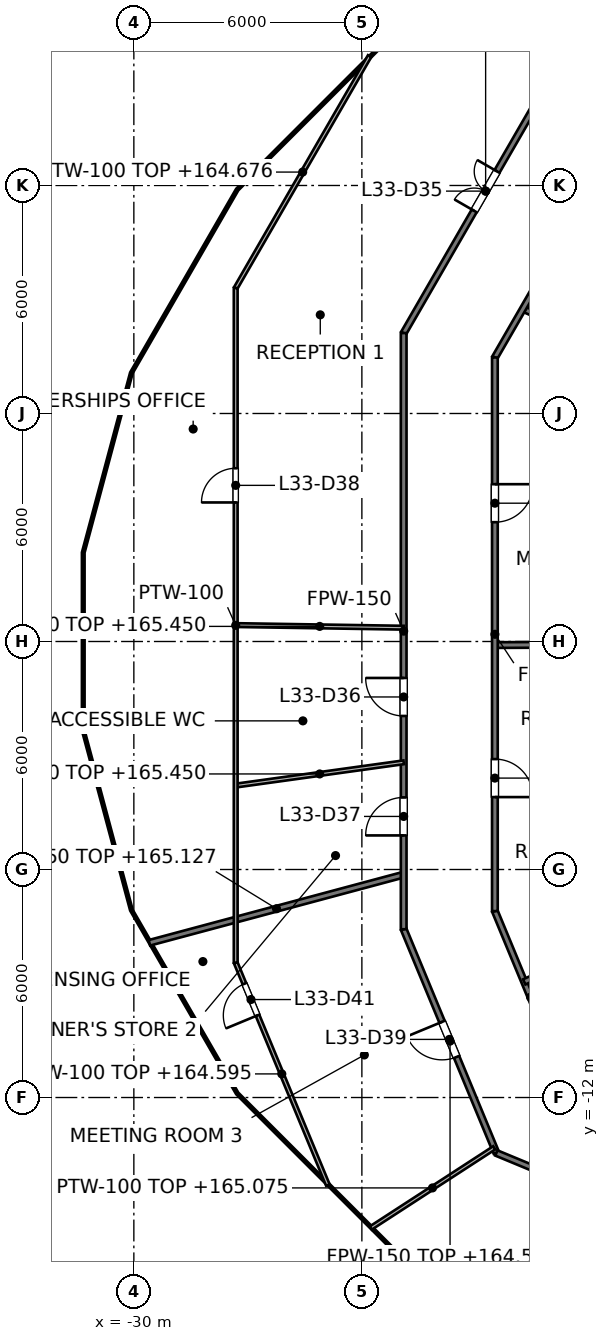
"""IFC4 building model, lengths in metres.
Left out: names, types, materials, properties, quantities, classifications, styles, units other than length and angle.
Written with IfcOpenShell. Run it as: python <this file> out.ifc"""

import sys

from ifc_helpers import new_model, si_unit, direction, frame, frame_2d, origin, place, context, subcontext, project, spatial, rectangle, extrude, element, fill, save


model = new_model("IFC4")
c1 = context("Model", 3, precision=1e-05, world=origin(), true_north=direction((0.0, 1.0)))
c2 = subcontext(c1, "Body", "Model", "MODEL_VIEW")
j1 = project(units=[si_unit("LENGTHUNIT", "METRE"), si_unit("PLANEANGLEUNIT", "RADIAN")], contexts=[c1])
p1 = place(None, origin())
s1 = spatial("IfcSite", under=j1, at=p1, CompositionType="ELEMENT")
p2 = place(p1, origin())
s2 = spatial("IfcBuilding", under=s1, at=p2, CompositionType="ELEMENT")
p3 = place(p2, frame((0.0, 0.0, 161.6)))
s3 = spatial("IfcBuildingStorey", under=s2, at=p3, CompositionType="ELEMENT", Elevation=161.6)
p4 = place(p3, frame((-22.9, -7.572, 0.0), z_axis=(0.0, 0.0, 1.0), x_axis=(0.382860357704, -0.923806227788, 0.0)))
e1 = element("IfcWall", 1, at=p4, inside=s3, PredefinedType="PARTITIONING", context=c2, shape_type="SweptSolid", body=[
    extrude(rectangle(XDim=6.374, YDim=0.15, at=frame_2d((3.187, 0.0))), origin(), (0.0, 0.0, 1.0), 2.995),
])
p5 = place(p4, frame((2.638, 0.0, 0.0)))
e2 = element("IfcOpeningElement", 2, at=p5, cuts=e1, PredefinedType="OPENING", context=c2, shape_type="SweptSolid", body=[
    extrude(rectangle(XDim=1.0, YDim=2.1, at=frame_2d((0.5, 1.05))), frame((0.0, 0.075, 0.0), z_axis=(0.0, -1.0, 0.0), x_axis=(1.0, 0.0, 0.0)), (0.0, 0.0, 1.0), 0.15),
])
p6 = place(p3, frame((-20.5, -7.095, 0.0), z_axis=(0.0, 0.0, 1.0), x_axis=(0.382878184095, -0.923798839653, 0.0)))
e3 = element("IfcWall", 3, at=p6, inside=s3, PredefinedType="PARTITIONING", context=c2, shape_type="SweptSolid", body=[
    extrude(rectangle(XDim=4.902, YDim=0.15, at=frame_2d((2.451, 0.0))), origin(), (0.0, 0.0, 1.0), 3.076),
])
p7 = place(p3, frame((-19.76, 8.755, 0.0), z_axis=(0.0, 0.0, 1.0), x_axis=(0.91424834547, -0.405154245695, 0.0)))
e4 = element("IfcWall", 4, at=p7, inside=s3, PredefinedType="PARTITIONING", context=c2, shape_type="SweptSolid", body=[
    extrude(rectangle(XDim=5.318, YDim=0.15, at=frame_2d((2.659, 0.0))), origin(), (0.0, 0.0, 1.0), 3.076),
])
p8 = place(p3, frame((-20.46, -13.46, 0.0), z_axis=(0.0, 0.0, 1.0), x_axis=(0.923801547606, -0.382871650349, 0.0)))
e5 = element("IfcWall", 5, at=p8, inside=s3, PredefinedType="PARTITIONING", context=c2, shape_type="SweptSolid", body=[
    extrude(rectangle(XDim=6.415, YDim=0.15, at=frame_2d((3.208, 0.0))), origin(), (0.0, 0.0, 1.0), 2.927),
])
p9 = place(p8, frame((2.707, 0.0, 0.0)))
e6 = element("IfcOpeningElement", 6, at=p9, cuts=e5, PredefinedType="OPENING", context=c2, shape_type="SweptSolid", body=[
    extrude(rectangle(XDim=1.0, YDim=2.1, at=frame_2d((0.5, 1.05))), frame((0.0, 0.075, 0.0), z_axis=(0.0, -1.0, 0.0), x_axis=(1.0, 0.0, 0.0)), (0.0, 0.0, 1.0), 0.15),
])
p10 = place(p3, frame((-20.5, -0.094, 0.0), z_axis=(0.0, 0.0, 1.0), x_axis=(0.999990148138, 0.004438876723, 0.0)))
e7 = element("IfcWall", 7, at=p10, inside=s3, PredefinedType="PARTITIONING", context=c2, shape_type="SweptSolid", body=[
    extrude(rectangle(XDim=5.5, YDim=0.15, at=frame_2d((2.75, 0.0))), origin(), (0.0, 0.0, 1.0), 2.927),
])
p11 = place(p3, frame((-29.591, -7.929, 0.0), z_axis=(0.0, 0.0, 1.0), x_axis=(0.965911864238, 0.258871146567, 0.0)))
e8 = element("IfcWall", 8, at=p11, inside=s3, PredefinedType="PARTITIONING", context=c2, shape_type="SweptSolid", body=[
    extrude(rectangle(XDim=6.927, YDim=0.15, at=frame_2d((3.463, 0.0))), origin(), (0.0, 0.0, 1.0), 3.527),
])
p12 = place(p3, frame((-19.728, -8.958, 0.0), z_axis=(0.0, 0.0, 1.0), x_axis=(0.910629511797, 0.413223779863, 0.0)))
e9 = element("IfcWall", 9, at=p12, inside=s3, PredefinedType="PARTITIONING", context=c2, shape_type="SweptSolid", body=[
    extrude(rectangle(XDim=5.368, YDim=0.15, at=frame_2d((2.684, 0.0))), origin(), (0.0, 0.0, 1.0), 3.85),
])
p13 = place(p3, frame((-20.5, 7.474, 0.0), z_axis=(0.0, 0.0, 1.0), x_axis=(0.500012665616, 0.866018091164, 0.0)))
e10 = element("IfcWall", 10, at=p13, inside=s3, PredefinedType="PARTITIONING", context=c2, shape_type="SweptSolid", body=[
    extrude(rectangle(XDim=6.602, YDim=0.15, at=frame_2d((3.301, 0.0))), origin(), (0.0, 0.0, 1.0), 2.995),
])
p14 = place(p13, frame((2.803, 0.0, 0.0)))
e11 = element("IfcOpeningElement", 11, at=p14, cuts=e10, PredefinedType="OPENING", context=c2, shape_type="SweptSolid", body=[
    extrude(rectangle(XDim=1.0, YDim=2.1, at=frame_2d((0.5, 1.05))), frame((0.0, 0.075, 0.0), z_axis=(0.0, -1.0, 0.0), x_axis=(1.0, 0.0, 0.0)), (0.0, 0.0, 1.0), 0.15),
])
p15 = place(p3, frame((-22.9, 8.117, 0.0), z_axis=(0.0, 0.0, 1.0), x_axis=(0.499996047583, 0.866027685701, 0.0)))
e12 = element("IfcWall", 12, at=p15, inside=s3, PredefinedType="PARTITIONING", context=c2, shape_type="SweptSolid", body=[
    extrude(rectangle(XDim=8.625, YDim=0.15, at=frame_2d((4.313, 0.0))), origin(), (0.0, 0.0, 1.0), 2.995),
])
p16 = place(p15, frame((3.713, 0.0, 0.0)))
e13 = element("IfcOpeningElement", 13, at=p16, cuts=e12, PredefinedType="OPENING", context=c2, shape_type="SweptSolid", body=[
    extrude(rectangle(XDim=1.2, YDim=2.1, at=frame_2d((0.6, 1.05))), frame((0.0, 0.075, 0.0), z_axis=(0.0, -1.0, 0.0), x_axis=(1.0, 0.0, 0.0)), (0.0, 0.0, 1.0), 0.15),
])
p17 = place(p3, frame((-20.5, -7.095, 0.0), z_axis=(0.0, 0.0, 1.0), x_axis=(0.0, 1.0, 0.0)))
e14 = element("IfcWall", 14, at=p17, inside=s3, PredefinedType="PARTITIONING", context=c2, shape_type="SweptSolid", body=[
    extrude(rectangle(XDim=14.569, YDim=0.15, at=frame_2d((7.285, 0.0))), origin(), (0.0, 0.0, 1.0), 2.927),
])
p18 = place(p17, frame((10.234, 0.0, 0.0)))
e15 = element("IfcOpeningElement", 15, at=p18, cuts=e14, PredefinedType="OPENING", context=c2, shape_type="SweptSolid", body=[
    extrude(rectangle(XDim=1.0, YDim=2.1, at=frame_2d((0.5, 1.05))), frame((0.0, 0.075, 0.0), z_axis=(0.0, -1.0, 0.0), x_axis=(1.0, 0.0, 0.0)), (0.0, 0.0, 1.0), 0.15),
])
p19 = place(p17, frame((3.0, 0.0, 0.0)))
e16 = element("IfcOpeningElement", 16, at=p19, cuts=e14, PredefinedType="OPENING", context=c2, shape_type="SweptSolid", body=[
    extrude(rectangle(XDim=1.0, YDim=2.1, at=frame_2d((0.5, 1.05))), frame((0.0, 0.075, 0.0), z_axis=(0.0, -1.0, 0.0), x_axis=(1.0, 0.0, 0.0)), (0.0, 0.0, 1.0), 0.15),
])
p20 = place(p3, frame((-22.9, -7.572, 0.0), z_axis=(0.0, 0.0, 1.0), x_axis=(0.0, 1.0, 0.0)))
e17 = element("IfcWall", 17, at=p20, inside=s3, PredefinedType="PARTITIONING", context=c2, shape_type="SweptSolid", body=[
    extrude(rectangle(XDim=15.689, YDim=0.15, at=frame_2d((7.844, 0.0))), origin(), (0.0, 0.0, 1.0), 2.927),
])
p21 = place(p20, frame((5.612, 0.0, 0.0)))
e18 = element("IfcOpeningElement", 18, at=p21, cuts=e17, PredefinedType="OPENING", context=c2, shape_type="SweptSolid", body=[
    extrude(rectangle(XDim=1.0, YDim=2.1, at=frame_2d((0.5, 1.05))), frame((0.0, 0.075, 0.0), z_axis=(0.0, -1.0, 0.0), x_axis=(1.0, 0.0, 0.0)), (0.0, 0.0, 1.0), 0.15),
])
p22 = place(p20, frame((2.469, 0.0, 0.0)))
e19 = element("IfcOpeningElement", 19, at=p22, cuts=e17, PredefinedType="OPENING", context=c2, shape_type="SweptSolid", body=[
    extrude(rectangle(XDim=1.0, YDim=2.1, at=frame_2d((0.5, 1.05))), frame((0.0, 0.075, 0.0), z_axis=(0.0, -1.0, 0.0), x_axis=(1.0, 0.0, 0.0)), (0.0, 0.0, 1.0), 0.15),
])
p23 = place(p3, frame((-27.32, -8.452, 0.0), z_axis=(0.0, 0.0, 1.0), x_axis=(0.382847431698, -0.923811584709, 0.0)))
e20 = element("IfcWall", 20, at=p23, inside=s3, PredefinedType="PARTITIONING", context=c2, shape_type="SweptSolid", body=[
    extrude(rectangle(XDim=6.337, YDim=0.1, at=frame_2d((3.168, 0.0))), origin(), (0.0, 0.0, 1.0), 2.995),
])
p24 = place(p23, frame((0.6, 0.0, 0.0)))
e21 = element("IfcOpeningElement", 21, at=p24, cuts=e20, PredefinedType="OPENING", context=c2, shape_type="SweptSolid", body=[
    extrude(rectangle(XDim=0.9, YDim=2.1, at=frame_2d((0.45, 1.05))), frame((0.0, 0.05, 0.0), z_axis=(0.0, -1.0, 0.0), x_axis=(1.0, 0.0, 0.0)), (0.0, 0.0, 1.0), 0.1),
])
p25 = place(p3, frame((-27.32, 0.432, 0.0), z_axis=(0.0, 0.0, 1.0), x_axis=(0.999878719173, -0.015573918741, 0.0)))
e22 = element("IfcWall", 22, at=p25, inside=s3, PredefinedType="PARTITIONING", context=c2, shape_type="SweptSolid", body=[
    extrude(rectangle(XDim=4.421, YDim=0.1, at=frame_2d((2.21, 0.0))), origin(), (0.0, 0.0, 1.0), 3.85),
])
p26 = place(p3, frame((-27.32, -3.792, 0.0), z_axis=(0.0, 0.0, 1.0), x_axis=(0.990518967412, 0.137376035745, 0.0)))
e23 = element("IfcWall", 23, at=p26, inside=s3, PredefinedType="PARTITIONING", context=c2, shape_type="SweptSolid", body=[
    extrude(rectangle(XDim=4.462, YDim=0.1, at=frame_2d((2.231, 0.0))), origin(), (0.0, 0.0, 1.0), 3.85),
])
p27 = place(p3, frame((-23.766, -15.434, 0.0), z_axis=(0.0, 0.0, 1.0), x_axis=(0.838650885555, 0.544669342039, 0.0)))
e24 = element("IfcWall", 24, at=p27, inside=s3, PredefinedType="PARTITIONING", context=c2, shape_type="SweptSolid", body=[
    extrude(rectangle(XDim=3.874, YDim=0.1, at=frame_2d((1.937, 0.0))), origin(), (0.0, 0.0, 1.0), 3.475),
])
p28 = place(p3, frame((-27.32, 9.301, 0.0), z_axis=(0.0, 0.0, 1.0), x_axis=(0.500043278267, 0.866000415624, 0.0)))
e25 = element("IfcWall", 25, at=p28, inside=s3, PredefinedType="PARTITIONING", context=c2, shape_type="SweptSolid", body=[
    extrude(rectangle(XDim=7.048, YDim=0.1, at=frame_2d((3.524, 0.0))), origin(), (0.0, 0.0, 1.0), 3.076),
])
p29 = place(p3, frame((-27.32, -8.452, 0.0), z_axis=(0.0, 0.0, 1.0), x_axis=(0.0, 1.0, 0.0)))
e26 = element("IfcWall", 26, at=p29, inside=s3, PredefinedType="PARTITIONING", context=c2, shape_type="SweptSolid", body=[
    extrude(rectangle(XDim=17.753, YDim=0.1, at=frame_2d((8.876, 0.0))), origin(), (0.0, 0.0, 1.0), 2.927),
])
p30 = place(p29, frame((12.111, 0.0, 0.0)))
e27 = element("IfcOpeningElement", 27, at=p30, cuts=e26, PredefinedType="OPENING", context=c2, shape_type="SweptSolid", body=[
    extrude(rectangle(XDim=0.9, YDim=2.1, at=frame_2d((0.45, 1.05))), frame((0.0, 0.05, 0.0), z_axis=(0.0, -1.0, 0.0), x_axis=(1.0, 0.0, 0.0)), (0.0, 0.0, 1.0), 0.1),
])
p31 = place(p18, origin())
e28 = element("IfcDoor", 28, at=p31, inside=s3, OperationType="SINGLE_SWING_RIGHT", PredefinedType="DOOR", context=c2, shape_type="SweptSolid", body=[
    extrude(rectangle(XDim=1.0, YDim=2.1, at=frame_2d((0.5, 1.05))), frame((0.0, 0.025, 0.0), z_axis=(0.0, -1.0, 0.0), x_axis=(1.0, 0.0, 0.0)), (0.0, 0.0, 1.0), 0.05),
])
fill(e15, e28)
p32 = place(p19, origin())
e29 = element("IfcDoor", 29, at=p32, inside=s3, OperationType="SINGLE_SWING_LEFT", PredefinedType="DOOR", context=c2, shape_type="SweptSolid", body=[
    extrude(rectangle(XDim=1.0, YDim=2.1, at=frame_2d((0.5, 1.05))), frame((0.0, 0.025, 0.0), z_axis=(0.0, -1.0, 0.0), x_axis=(1.0, 0.0, 0.0)), (0.0, 0.0, 1.0), 0.05),
])
fill(e16, e29)
p33 = place(p16, origin())
e30 = element("IfcDoor", 30, at=p33, inside=s3, OperationType="DOUBLE_DOOR_SINGLE_SWING", PredefinedType="DOOR", context=c2, shape_type="SweptSolid", body=[
    extrude(rectangle(XDim=1.2, YDim=2.1, at=frame_2d((0.6, 1.05))), frame((0.0, 0.025, 0.0), z_axis=(0.0, -1.0, 0.0), x_axis=(1.0, 0.0, 0.0)), (0.0, 0.0, 1.0), 0.05),
])
fill(e13, e30)
p34 = place(p21, origin())
e31 = element("IfcDoor", 31, at=p34, inside=s3, OperationType="SINGLE_SWING_RIGHT", PredefinedType="DOOR", context=c2, shape_type="SweptSolid", body=[
    extrude(rectangle(XDim=1.0, YDim=2.1, at=frame_2d((0.5, 1.05))), frame((0.0, 0.025, 0.0), z_axis=(0.0, -1.0, 0.0), x_axis=(1.0, 0.0, 0.0)), (0.0, 0.0, 1.0), 0.05),
])
fill(e18, e31)
p35 = place(p22, origin())
e32 = element("IfcDoor", 32, at=p35, inside=s3, OperationType="SINGLE_SWING_LEFT", PredefinedType="DOOR", context=c2, shape_type="SweptSolid", body=[
    extrude(rectangle(XDim=1.0, YDim=2.1, at=frame_2d((0.5, 1.05))), frame((0.0, 0.025, 0.0), z_axis=(0.0, -1.0, 0.0), x_axis=(1.0, 0.0, 0.0)), (0.0, 0.0, 1.0), 0.05),
])
fill(e19, e32)
p36 = place(p30, origin())
e33 = element("IfcDoor", 33, at=p36, inside=s3, OperationType="SINGLE_SWING_LEFT", PredefinedType="DOOR", context=c2, shape_type="SweptSolid", body=[
    extrude(rectangle(XDim=0.9, YDim=2.1, at=frame_2d((0.45, 1.05))), frame((0.0, 0.025, 0.0), z_axis=(0.0, -1.0, 0.0), x_axis=(1.0, 0.0, 0.0)), (0.0, 0.0, 1.0), 0.05),
])
fill(e27, e33)
p37 = place(p5, origin())
e34 = element("IfcDoor", 34, at=p37, inside=s3, OperationType="SINGLE_SWING_LEFT", PredefinedType="DOOR", context=c2, shape_type="SweptSolid", body=[
    extrude(rectangle(XDim=1.0, YDim=2.1, at=frame_2d((0.5, 1.05))), frame((0.0, 0.025, 0.0), z_axis=(0.0, -1.0, 0.0), x_axis=(1.0, 0.0, 0.0)), (0.0, 0.0, 1.0), 0.05),
])
fill(e2, e34)
p38 = place(p24, origin())
e35 = element("IfcDoor", 35, at=p38, inside=s3, OperationType="SINGLE_SWING_RIGHT", PredefinedType="DOOR", context=c2, shape_type="SweptSolid", body=[
    extrude(rectangle(XDim=0.9, YDim=2.1, at=frame_2d((0.45, 1.05))), frame((0.0, 0.025, 0.0), z_axis=(0.0, -1.0, 0.0), x_axis=(1.0, 0.0, 0.0)), (0.0, 0.0, 1.0), 0.05),
])
fill(e21, e35)
save(model, sys.argv[1])
